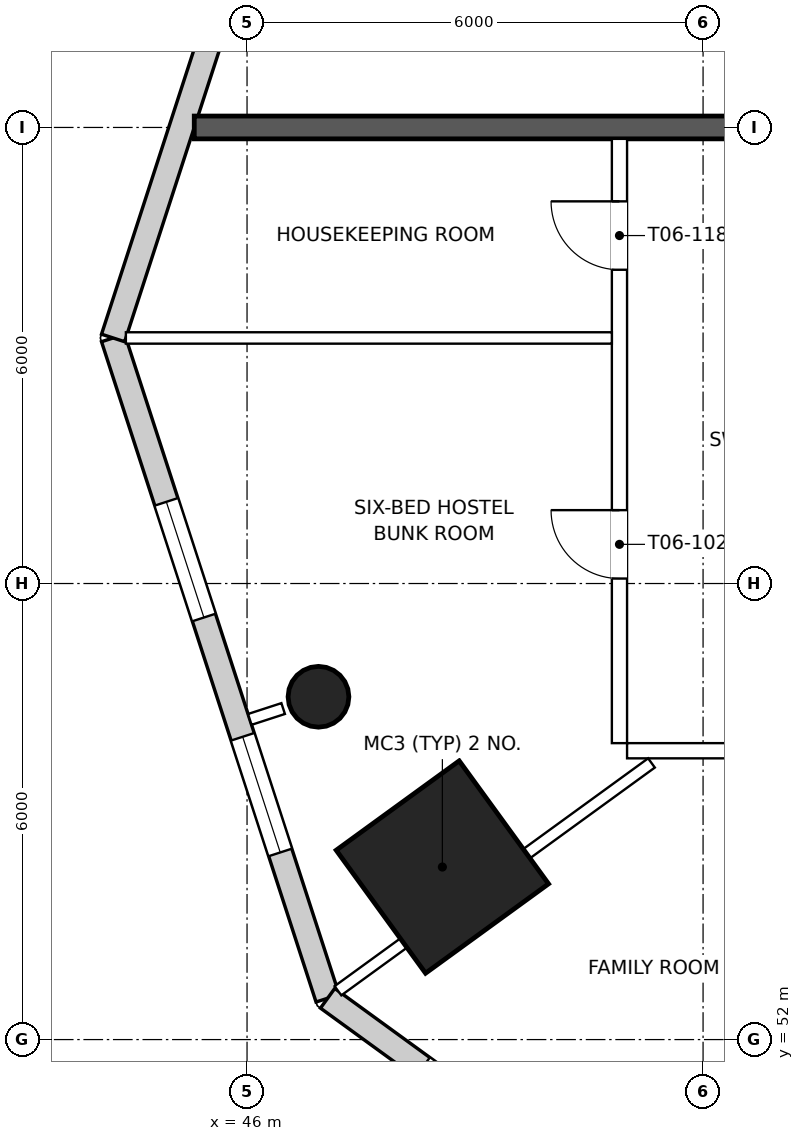
"""IFC4 building model, lengths in metres.
Left out: names, types, materials, properties, quantities, classifications, styles, units other than length and angle.
Written with IfcOpenShell. Run it as: python <this file> out.ifc"""

import sys

from ifc_helpers import new_model, si_unit, direction, frame, frame_2d, origin, origin_2d, place, context, subcontext, project, spatial, rectangle, circle, extrude, element, fill, save


model = new_model("IFC4")
c1 = context("Model", 3, precision=1e-05, world=origin(), true_north=direction((0.0, 1.0)))
c2 = subcontext(c1, "Body", "Model", "MODEL_VIEW")
j1 = project(units=[si_unit("LENGTHUNIT", "METRE"), si_unit("PLANEANGLEUNIT", "RADIAN")], contexts=[c1])
p1 = place(None, origin())
s1 = spatial("IfcSite", under=j1, at=p1, CompositionType="ELEMENT")
p2 = place(p1, origin())
s2 = spatial("IfcBuilding", under=s1, at=p2, CompositionType="ELEMENT")
p3 = place(p2, frame((0.0, 0.0, 98.6)))
s3 = spatial("IfcBuildingStorey", under=s2, at=p3, CompositionType="ELEMENT", Elevation=98.6)
p4 = place(p3, frame((46.94, 56.51, 0.0), z_axis=(0.0, 0.0, 1.0), x_axis=(1.0, 0.0, 0.0)))
e1 = element("IfcColumn", 1, at=p4, inside=s3, PredefinedType="COLUMN", context=c2, shape_type="SweptSolid", body=[
    extrude(circle(Radius=0.4, at=origin_2d()), origin(), (0.0, 0.0, 1.0), 3.9),
])
p5 = place(p3, frame((48.57, 54.27, 0.0), z_axis=(0.0, 0.0, 1.0), x_axis=(-0.809016994375, -0.587785252292, 0.0)))
e2 = element("IfcColumn", 2, at=p5, inside=s3, PredefinedType="COLUMN", context=c2, shape_type="SweptSolid", body=[
    extrude(rectangle(XDim=2.0, YDim=2.0, at=origin_2d()), origin(), (0.0, 0.0, 1.0), 3.9),
])
p6 = place(p3, frame((44.238, 61.231, 0.0), z_axis=(0.0, 0.0, 1.0), x_axis=(0.309026240246, -0.95105351208, 0.0)))
e3 = element("IfcWall", 3, at=p6, inside=s3, PredefinedType="SOLIDWALL", context=c2, shape_type="SweptSolid", body=[
    extrude(rectangle(XDim=9.134, YDim=0.32, at=frame_2d((4.567, 0.0))), origin(), (0.0, 0.0, 1.0), 3.6),
])
p7 = place(p6, frame((2.267, 0.0, 0.9)))
e4 = element("IfcOpeningElement", 4, at=p7, cuts=e3, PredefinedType="OPENING", context=c2, shape_type="SweptSolid", body=[
    extrude(rectangle(XDim=1.6, YDim=1.8, at=frame_2d((0.8, 0.9))), frame((0.0, 0.17, 0.0), z_axis=(0.0, -1.0, 0.0), x_axis=(1.0, 0.0, 0.0)), (0.0, 0.0, 1.0), 0.34),
])
p8 = place(p6, frame((5.517, 0.0, 0.9)))
e5 = element("IfcOpeningElement", 5, at=p8, cuts=e3, PredefinedType="OPENING", context=c2, shape_type="SweptSolid", body=[
    extrude(rectangle(XDim=1.6, YDim=1.8, at=frame_2d((0.8, 0.9))), frame((0.0, 0.17, 0.0), z_axis=(0.0, -1.0, 0.0), x_axis=(1.0, 0.0, 0.0)), (0.0, 0.0, 1.0), 0.34),
])
p9 = place(p3, frame((47.06, 52.543, 0.0), z_axis=(0.0, 0.0, 1.0), x_axis=(0.809012643171, -0.587791241165, 0.0)))
e6 = element("IfcWall", 6, at=p9, inside=s3, PredefinedType="SOLIDWALL", context=c2, shape_type="SweptSolid", body=[
    extrude(rectangle(XDim=22.592, YDim=0.32, at=frame_2d((11.296, 0.0))), origin(), (0.0, 0.0, 1.0), 3.6),
])
p10 = place(p9, frame((1.546, 0.0, 0.9)))
e7 = element("IfcOpeningElement", 7, at=p10, cuts=e6, PredefinedType="OPENING", context=c2, shape_type="SweptSolid", body=[
    extrude(rectangle(XDim=1.5, YDim=1.8, at=frame_2d((0.75, 0.9))), frame((0.0, 0.17, 0.0), z_axis=(0.0, -1.0, 0.0), x_axis=(1.0, 0.0, 0.0)), (0.0, 0.0, 1.0), 0.34),
])
p11 = place(p9, frame((5.096, 0.0, 0.9)))
e8 = element("IfcOpeningElement", 8, at=p11, cuts=e6, PredefinedType="OPENING", context=c2, shape_type="SweptSolid", body=[
    extrude(rectangle(XDim=1.5, YDim=1.8, at=frame_2d((0.75, 0.9))), frame((0.0, 0.17, 0.0), z_axis=(0.0, -1.0, 0.0), x_axis=(1.0, 0.0, 0.0)), (0.0, 0.0, 1.0), 0.34),
])
p12 = place(p9, frame((7.546, 0.0, 0.9)))
e9 = element("IfcOpeningElement", 9, at=p12, cuts=e6, PredefinedType="OPENING", context=c2, shape_type="SweptSolid", body=[
    extrude(rectangle(XDim=1.5, YDim=1.8, at=frame_2d((0.75, 0.9))), frame((0.0, 0.17, 0.0), z_axis=(0.0, -1.0, 0.0), x_axis=(1.0, 0.0, 0.0)), (0.0, 0.0, 1.0), 0.34),
])
p13 = place(p9, frame((10.646, 0.0, 0.9)))
e10 = element("IfcOpeningElement", 10, at=p13, cuts=e6, PredefinedType="OPENING", context=c2, shape_type="SweptSolid", body=[
    extrude(rectangle(XDim=1.5, YDim=1.8, at=frame_2d((0.75, 0.9))), frame((0.0, 0.17, 0.0), z_axis=(0.0, -1.0, 0.0), x_axis=(1.0, 0.0, 0.0)), (0.0, 0.0, 1.0), 0.34),
])
p14 = place(p9, frame((13.546, 0.0, 0.9)))
e11 = element("IfcOpeningElement", 11, at=p14, cuts=e6, PredefinedType="OPENING", context=c2, shape_type="SweptSolid", body=[
    extrude(rectangle(XDim=1.5, YDim=1.8, at=frame_2d((0.75, 0.9))), frame((0.0, 0.17, 0.0), z_axis=(0.0, -1.0, 0.0), x_axis=(1.0, 0.0, 0.0)), (0.0, 0.0, 1.0), 0.34),
])
p15 = place(p9, frame((16.546, 0.0, 0.9)))
e12 = element("IfcOpeningElement", 12, at=p15, cuts=e6, PredefinedType="OPENING", context=c2, shape_type="SweptSolid", body=[
    extrude(rectangle(XDim=1.5, YDim=1.8, at=frame_2d((0.75, 0.9))), frame((0.0, 0.17, 0.0), z_axis=(0.0, -1.0, 0.0), x_axis=(1.0, 0.0, 0.0)), (0.0, 0.0, 1.0), 0.34),
])
p16 = place(p9, frame((19.546, 0.0, 0.9)))
e13 = element("IfcOpeningElement", 13, at=p16, cuts=e6, PredefinedType="OPENING", context=c2, shape_type="SweptSolid", body=[
    extrude(rectangle(XDim=1.5, YDim=1.8, at=frame_2d((0.75, 0.9))), frame((0.0, 0.17, 0.0), z_axis=(0.0, -1.0, 0.0), x_axis=(1.0, 0.0, 0.0)), (0.0, 0.0, 1.0), 0.34),
])
p17 = place(p3, frame((51.112, 82.389, 0.0), z_axis=(0.0, 0.0, 1.0), x_axis=(-0.309018577053, -0.95105600205, 0.0)))
e14 = element("IfcWall", 14, at=p17, inside=s3, PredefinedType="SOLIDWALL", context=c2, shape_type="SweptSolid", body=[
    extrude(rectangle(XDim=22.247, YDim=0.32, at=frame_2d((11.124, 0.0))), origin(), (0.0, 0.0, 1.0), 3.6),
])
p18 = place(p17, frame((1.374, 0.0, 0.9)))
e15 = element("IfcOpeningElement", 15, at=p18, cuts=e14, PredefinedType="OPENING", context=c2, shape_type="SweptSolid", body=[
    extrude(rectangle(XDim=1.5, YDim=1.8, at=frame_2d((0.75, 0.9))), frame((0.0, 0.17, 0.0), z_axis=(0.0, -1.0, 0.0), x_axis=(1.0, 0.0, 0.0)), (0.0, 0.0, 1.0), 0.34),
])
p19 = place(p17, frame((4.374, 0.0, 0.9)))
e16 = element("IfcOpeningElement", 16, at=p19, cuts=e14, PredefinedType="OPENING", context=c2, shape_type="SweptSolid", body=[
    extrude(rectangle(XDim=1.5, YDim=1.8, at=frame_2d((0.75, 0.9))), frame((0.0, 0.17, 0.0), z_axis=(0.0, -1.0, 0.0), x_axis=(1.0, 0.0, 0.0)), (0.0, 0.0, 1.0), 0.34),
])
p20 = place(p17, frame((7.374, 0.0, 0.9)))
e17 = element("IfcOpeningElement", 17, at=p20, cuts=e14, PredefinedType="OPENING", context=c2, shape_type="SweptSolid", body=[
    extrude(rectangle(XDim=1.5, YDim=1.8, at=frame_2d((0.75, 0.9))), frame((0.0, 0.17, 0.0), z_axis=(0.0, -1.0, 0.0), x_axis=(1.0, 0.0, 0.0)), (0.0, 0.0, 1.0), 0.34),
])
p21 = place(p17, frame((10.374, 0.0, 0.9)))
e18 = element("IfcOpeningElement", 18, at=p21, cuts=e14, PredefinedType="OPENING", context=c2, shape_type="SweptSolid", body=[
    extrude(rectangle(XDim=1.5, YDim=1.8, at=frame_2d((0.75, 0.9))), frame((0.0, 0.17, 0.0), z_axis=(0.0, -1.0, 0.0), x_axis=(1.0, 0.0, 0.0)), (0.0, 0.0, 1.0), 0.34),
])
p22 = place(p17, frame((13.374, 0.0, 0.9)))
e19 = element("IfcOpeningElement", 19, at=p22, cuts=e14, PredefinedType="OPENING", context=c2, shape_type="SweptSolid", body=[
    extrude(rectangle(XDim=1.5, YDim=1.8, at=frame_2d((0.75, 0.9))), frame((0.0, 0.17, 0.0), z_axis=(0.0, -1.0, 0.0), x_axis=(1.0, 0.0, 0.0)), (0.0, 0.0, 1.0), 0.34),
])
p23 = place(p17, frame((16.374, 0.0, 0.9)))
e20 = element("IfcOpeningElement", 20, at=p23, cuts=e14, PredefinedType="OPENING", context=c2, shape_type="SweptSolid", body=[
    extrude(rectangle(XDim=1.5, YDim=1.8, at=frame_2d((0.75, 0.9))), frame((0.0, 0.17, 0.0), z_axis=(0.0, -1.0, 0.0), x_axis=(1.0, 0.0, 0.0)), (0.0, 0.0, 1.0), 0.34),
])
p24 = place(p3, frame((45.306, 64.0, 0.0), z_axis=(0.0, 0.0, 1.0), x_axis=(1.0, 0.0, 0.0)))
e21 = element("IfcWall", 21, at=p24, inside=s3, PredefinedType="PARTITIONING", context=c2, shape_type="SweptSolid", body=[
    extrude(rectangle(XDim=49.389, YDim=0.3, at=frame_2d((24.694, 0.0))), origin(), (0.0, 0.0, 1.0), 2.9),
])
p25 = place(p24, frame((16.331, 0.0, 0.0)))
e22 = element("IfcOpeningElement", 22, at=p25, cuts=e21, PredefinedType="OPENING", context=c2, shape_type="SweptSolid", body=[
    extrude(rectangle(XDim=2.0, YDim=2.1, at=frame_2d((1.0, 1.05))), frame((0.0, 0.16, 0.0), z_axis=(0.0, -1.0, 0.0), x_axis=(1.0, 0.0, 0.0)), (0.0, 0.0, 1.0), 0.32),
])
p26 = place(p24, frame((31.058, 0.0, 0.0)))
e23 = element("IfcOpeningElement", 23, at=p26, cuts=e21, PredefinedType="OPENING", context=c2, shape_type="SweptSolid", body=[
    extrude(rectangle(XDim=2.0, YDim=2.1, at=frame_2d((1.0, 1.05))), frame((0.0, 0.16, 0.0), z_axis=(0.0, -1.0, 0.0), x_axis=(1.0, 0.0, 0.0)), (0.0, 0.0, 1.0), 0.32),
])
p27 = place(p3, frame((58.946, 55.8, 0.0), z_axis=(0.0, 0.0, 1.0), x_axis=(-1.0, 0.0, 0.0)))
e24 = element("IfcWall", 24, at=p27, inside=s3, PredefinedType="PARTITIONING", context=c2, shape_type="SweptSolid", body=[
    extrude(rectangle(XDim=7.946, YDim=0.2, at=frame_2d((3.973, 0.0))), origin(), (0.0, 0.0, 1.0), 3.0),
])
p28 = place(p27, frame((1.669, 0.0, 0.0)))
e25 = element("IfcOpeningElement", 25, at=p28, cuts=e24, PredefinedType="OPENING", context=c2, shape_type="SweptSolid", body=[
    extrude(rectangle(XDim=0.9, YDim=2.1, at=frame_2d((0.45, 1.05))), frame((0.0, 0.11, 0.0), z_axis=(0.0, -1.0, 0.0), x_axis=(1.0, 0.0, 0.0)), (0.0, 0.0, 1.0), 0.22),
])
p29 = place(p3, frame((50.9, 55.9, 0.0), z_axis=(0.0, 0.0, 1.0), x_axis=(0.0, 1.0, 0.0)))
e26 = element("IfcWall", 26, at=p29, inside=s3, PredefinedType="PARTITIONING", context=c2, shape_type="SweptSolid", body=[
    extrude(rectangle(XDim=7.95, YDim=0.2, at=frame_2d((3.975, 0.0))), origin(), (0.0, 0.0, 1.0), 3.6),
])
p30 = place(p29, frame((2.165, 0.0, 0.0)))
e27 = element("IfcOpeningElement", 27, at=p30, cuts=e26, PredefinedType="OPENING", context=c2, shape_type="SweptSolid", body=[
    extrude(rectangle(XDim=0.9, YDim=2.1, at=frame_2d((0.45, 1.05))), frame((0.0, 0.11, 0.0), z_axis=(0.0, -1.0, 0.0), x_axis=(1.0, 0.0, 0.0)), (0.0, 0.0, 1.0), 0.22),
])
p31 = place(p29, frame((6.228, 0.0, 0.0)))
e28 = element("IfcOpeningElement", 28, at=p31, cuts=e26, PredefinedType="OPENING", context=c2, shape_type="SweptSolid", body=[
    extrude(rectangle(XDim=0.9, YDim=2.1, at=frame_2d((0.45, 1.05))), frame((0.0, 0.11, 0.0), z_axis=(0.0, -1.0, 0.0), x_axis=(1.0, 0.0, 0.0)), (0.0, 0.0, 1.0), 0.22),
])
p32 = place(p3, frame((44.406, 61.231, 0.0), z_axis=(0.0, 0.0, 1.0), x_axis=(1.0, 0.0, 0.0)))
e29 = element("IfcWall", 29, at=p32, inside=s3, PredefinedType="PARTITIONING", context=c2, shape_type="SweptSolid", body=[
    extrude(rectangle(XDim=6.394, YDim=0.15, at=frame_2d((3.197, 0.0))), origin(), (0.0, 0.0, 1.0), 2.9),
])
p33 = place(p3, frame((47.196, 52.642, 0.0), z_axis=(0.0, 0.0, 1.0), x_axis=(0.809009310944, 0.587795827483, 0.0)))
e30 = element("IfcWall", 30, at=p33, inside=s3, PredefinedType="PARTITIONING", context=c2, shape_type="SweptSolid", body=[
    extrude(rectangle(XDim=5.099, YDim=0.15, at=frame_2d((2.549, 0.0))), origin(), (0.0, 0.0, 1.0), 3.6),
])
p34 = place(p3, frame((46.475, 56.355, 0.0), z_axis=(0.0, 0.0, 1.0), x_axis=(-0.951037957901, -0.309074105406, 0.0)))
e31 = element("IfcWall", 31, at=p34, inside=s3, PredefinedType="PARTITIONING", context=c2, shape_type="SweptSolid", body=[
    extrude(rectangle(XDim=0.461, YDim=0.15, at=frame_2d((0.231, 0.0))), origin(), (0.0, 0.0, 1.0), 3.6),
])
p35 = place(p7, origin())
e32 = element("IfcWindow", 32, at=p35, inside=s3, PartitioningType="SINGLE_PANEL", PredefinedType="WINDOW", context=c2, shape_type="SweptSolid", body=[
    extrude(rectangle(XDim=1.6, YDim=1.8, at=frame_2d((0.8, 0.9))), frame((0.0, 0.07, 0.0), z_axis=(0.0, -1.0, 0.0), x_axis=(1.0, 0.0, 0.0)), (0.0, 0.0, 1.0), 0.06),
])
fill(e4, e32)
p36 = place(p8, origin())
e33 = element("IfcWindow", 33, at=p36, inside=s3, PartitioningType="SINGLE_PANEL", PredefinedType="WINDOW", context=c2, shape_type="SweptSolid", body=[
    extrude(rectangle(XDim=1.6, YDim=1.8, at=frame_2d((0.8, 0.9))), frame((0.0, 0.07, 0.0), z_axis=(0.0, -1.0, 0.0), x_axis=(1.0, 0.0, 0.0)), (0.0, 0.0, 1.0), 0.06),
])
fill(e5, e33)
p37 = place(p30, origin())
e34 = element("IfcDoor", 34, at=p37, inside=s3, OperationType="SINGLE_SWING_RIGHT", PredefinedType="DOOR", context=c2, shape_type="SweptSolid", body=[
    extrude(rectangle(XDim=0.9, YDim=2.1, at=frame_2d((0.45, 1.05))), frame((0.0, 0.025, 0.0), z_axis=(0.0, -1.0, 0.0), x_axis=(1.0, 0.0, 0.0)), (0.0, 0.0, 1.0), 0.05),
])
fill(e27, e34)
p38 = place(p31, origin())
e35 = element("IfcDoor", 35, at=p38, inside=s3, OperationType="SINGLE_SWING_RIGHT", PredefinedType="DOOR", context=c2, shape_type="SweptSolid", body=[
    extrude(rectangle(XDim=0.9, YDim=2.1, at=frame_2d((0.45, 1.05))), frame((0.0, 0.025, 0.0), z_axis=(0.0, -1.0, 0.0), x_axis=(1.0, 0.0, 0.0)), (0.0, 0.0, 1.0), 0.05),
])
fill(e28, e35)
save(model, sys.argv[1])
